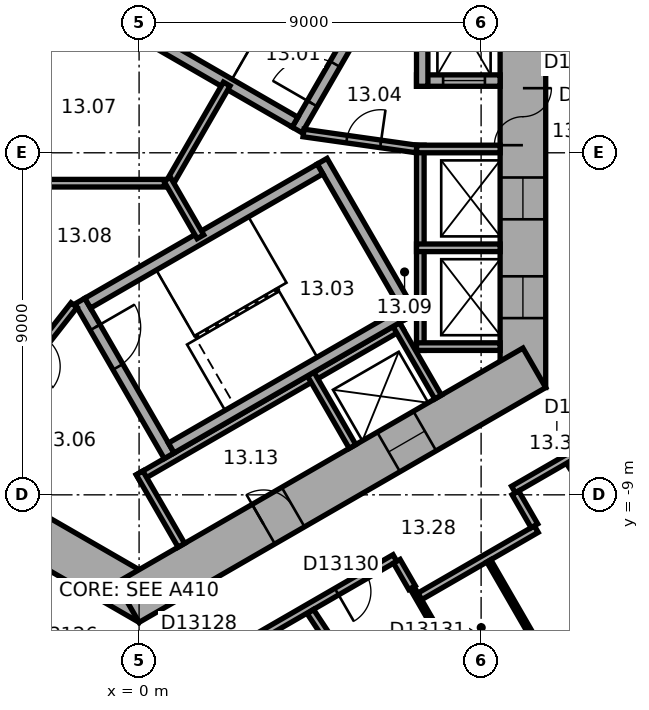
"""IFC4 building model, lengths in metres.
Left out: names, types, materials, properties, quantities, classifications, styles, units other than length and angle.
Written with IfcOpenShell. Run it as: python <this file> out.ifc"""

import sys

from ifc_helpers import new_model, si_unit, direction, frame, frame_2d, origin, place, context, subcontext, project, spatial, rectangle, extrude, element, fill, save


model = new_model("IFC4")
c1 = context("Model", 3, precision=1e-05, world=origin(), true_north=direction((0.0, 1.0)))
c2 = subcontext(c1, "Body", "Model", "MODEL_VIEW")
j1 = project(units=[si_unit("LENGTHUNIT", "METRE"), si_unit("PLANEANGLEUNIT", "RADIAN")], contexts=[c1])
p1 = place(None, origin())
s1 = spatial("IfcSite", under=j1, at=p1, CompositionType="ELEMENT")
p2 = place(p1, origin())
s2 = spatial("IfcBuilding", under=s1, at=p2, CompositionType="ELEMENT")
p3 = place(p2, frame((0.0, 0.0, 63.8)))
s3 = spatial("IfcBuildingStorey", under=s2, at=p3, CompositionType="ELEMENT", Elevation=63.8)
p4 = place(p3, frame((10.1, -6.177, 0.0), z_axis=(0.0, 0.0, 1.0), x_axis=(0.0, 1.0, 0.0)))
e1 = element("IfcWall", 1, at=p4, inside=s3, PredefinedType="SHEAR", context=c2, shape_type="SweptSolid", body=[
    extrude(rectangle(XDim=12.355, YDim=1.2, at=frame_2d((6.177, 0.0))), origin(), (0.0, 0.0, 1.0), 3.3),
])
p5 = place(p4, frame((6.378, 0.0, 0.0)))
e2 = element("IfcOpeningElement", 2, at=p5, cuts=e1, PredefinedType="OPENING", context=c2, shape_type="SweptSolid", body=[
    extrude(rectangle(XDim=1.5, YDim=2.1, at=frame_2d((0.75, 1.05))), frame((0.0, 0.61, 0.0), z_axis=(0.0, -1.0, 0.0), x_axis=(1.0, 0.0, 0.0)), (0.0, 0.0, 1.0), 1.22),
])
p6 = place(p4, frame((1.828, 0.0, 0.0)))
e3 = element("IfcOpeningElement", 3, at=p6, cuts=e1, PredefinedType="OPENING", context=c2, shape_type="SweptSolid", body=[
    extrude(rectangle(XDim=1.1, YDim=2.1, at=frame_2d((0.55, 1.05))), frame((0.0, 0.61, 0.0), z_axis=(0.0, -1.0, 0.0), x_axis=(1.0, 0.0, 0.0)), (0.0, 0.0, 1.0), 1.22),
])
p7 = place(p4, frame((4.427, 0.0, 0.0)))
e4 = element("IfcOpeningElement", 4, at=p7, cuts=e1, PredefinedType="OPENING", context=c2, shape_type="SweptSolid", body=[
    extrude(rectangle(XDim=1.1, YDim=2.1, at=frame_2d((0.55, 1.05))), frame((0.0, 0.61, 0.0), z_axis=(0.0, -1.0, 0.0), x_axis=(1.0, 0.0, 0.0)), (0.0, 0.0, 1.0), 1.22),
])
p8 = place(p3, frame((-10.4, -5.658, 0.0), z_axis=(0.0, 0.0, 1.0), x_axis=(0.866021384402, -0.500006961711, 0.0)))
e5 = element("IfcWall", 5, at=p8, inside=s3, PredefinedType="SHEAR", context=c2, shape_type="SweptSolid", body=[
    extrude(rectangle(XDim=12.355, YDim=1.2, at=frame_2d((6.178, 0.0))), origin(), (0.0, 0.0, 1.0), 3.3),
])
p9 = place(p8, frame((6.378, 0.0, 0.0)))
e6 = element("IfcOpeningElement", 6, at=p9, cuts=e5, PredefinedType="OPENING", context=c2, shape_type="SweptSolid", body=[
    extrude(rectangle(XDim=1.5, YDim=2.1, at=frame_2d((0.75, 1.05))), frame((0.0, 0.61, 0.0), z_axis=(0.0, -1.0, 0.0), x_axis=(1.0, 0.0, 0.0)), (0.0, 0.0, 1.0), 1.22),
])
p10 = place(p8, frame((3.228, 0.0, 0.0)))
e7 = element("IfcOpeningElement", 7, at=p10, cuts=e5, PredefinedType="OPENING", context=c2, shape_type="SweptSolid", body=[
    extrude(rectangle(XDim=0.9, YDim=2.1, at=frame_2d((0.45, 1.05))), frame((0.0, 0.61, 0.0), z_axis=(0.0, -1.0, 0.0), x_axis=(1.0, 0.0, 0.0)), (0.0, 0.0, 1.0), 1.22),
])
p11 = place(p3, frame((-0.3, -11.836, 0.0), z_axis=(0.0, 0.0, 1.0), x_axis=(0.866021384402, 0.500006961711, 0.0)))
e8 = element("IfcWall", 8, at=p11, inside=s3, PredefinedType="SHEAR", context=c2, shape_type="SweptSolid", body=[
    extrude(rectangle(XDim=12.355, YDim=1.2, at=frame_2d((6.178, 0.0))), origin(), (0.0, 0.0, 1.0), 3.3),
])
p12 = place(p11, frame((4.128, 0.0, 0.0)))
e9 = element("IfcOpeningElement", 9, at=p12, cuts=e8, PredefinedType="OPENING", context=c2, shape_type="SweptSolid", body=[
    extrude(rectangle(XDim=0.9, YDim=2.1, at=frame_2d((0.45, 1.05))), frame((0.0, 0.61, 0.0), z_axis=(0.0, -1.0, 0.0), x_axis=(1.0, 0.0, 0.0)), (0.0, 0.0, 1.0), 1.22),
])
p13 = place(p11, frame((7.928, 0.0, 0.0)))
e10 = element("IfcOpeningElement", 10, at=p13, cuts=e8, PredefinedType="OPENING", context=c2, shape_type="SweptSolid", body=[
    extrude(rectangle(XDim=1.1, YDim=2.1, at=frame_2d((0.55, 1.05))), frame((0.0, 0.61, 0.0), z_axis=(0.0, -1.0, 0.0), x_axis=(1.0, 0.0, 0.0)), (0.0, 0.0, 1.0), 1.22),
])
p14 = place(p3, frame((7.4, -5.2, 0.0), z_axis=(0.0, 0.0, 1.0), x_axis=(0.0, 1.0, 0.0)))
e11 = element("IfcWall", 11, at=p14, inside=s3, PredefinedType="PARTITIONING", context=c2, shape_type="SweptSolid", body=[
    extrude(rectangle(XDim=5.4, YDim=0.2, at=frame_2d((2.7, 0.0))), origin(), (0.0, 0.0, 1.0), 3.05),
])
for number, where, z_axis, x_axis in (
    (12, (7.3, -5.1, 0.0), (0.0, 0.0, 1.0), (1.0, 0.0, 0.0)),
    (13, (7.3, -2.5, 0.0), (0.0, 0.0, 1.0), (1.0, 0.0, 0.0)),
    (14, (7.3, 0.1, 0.0), (0.0, 0.0, 1.0), (1.0, 0.0, 0.0)),
):
    element("IfcWall", number, at=place(p3, frame(where, z_axis=z_axis, x_axis=x_axis)), inside=s3, PredefinedType="PARTITIONING", context=c2, shape_type="SweptSolid", body=[
        extrude(rectangle(XDim=2.2, YDim=0.2, at=frame_2d((1.1, 0.0))), origin(), (0.0, 0.0, 1.0), 3.05),
    ])
p15 = place(p3, frame((-0.024, -8.559, 0.0), z_axis=(0.0, 0.0, 1.0), x_axis=(0.866026010844, 0.49999894854, 0.0)))
e15 = element("IfcWall", 15, at=p15, inside=s3, PredefinedType="PARTITIONING", context=c2, shape_type="SweptSolid", body=[
    extrude(rectangle(XDim=8.0, YDim=0.2, at=frame_2d((4.0, 0.0))), origin(), (0.0, 0.0, 1.0), 3.05),
])
for number, where, z_axis, x_axis in (
    (16, (0.013, -8.422, 0.0), (0.0, 0.0, 1.0), (0.5, -0.866, 0.0)),
    (17, (4.516, -5.822, 0.0), (0.0, 0.0, 1.0), (0.5, -0.866, 0.0)),
    (18, (6.768, -4.522, 0.0), (0.0, 0.0, 1.0), (0.5, -0.866, 0.0)),
):
    element("IfcWall", number, at=place(p3, frame(where, z_axis=z_axis, x_axis=x_axis)), inside=s3, PredefinedType="PARTITIONING", context=c2, shape_type="SweptSolid", body=[
        extrude(rectangle(XDim=2.2, YDim=0.2, at=frame_2d((1.1, 0.0))), origin(), (0.0, 0.0, 1.0), 3.05),
    ])
p16 = place(p3, frame((4.158, 0.602, 0.0), z_axis=(0.0, 0.0, 1.0), x_axis=(0.499977259774, 0.866038532462, 0.0)))
e19 = element("IfcWall", 19, at=p16, inside=s3, PredefinedType="SHEAR", context=c2, shape_type="SweptSolid", body=[
    extrude(rectangle(XDim=4.7, YDim=0.3, at=frame_2d((2.35, 0.0))), origin(), (0.0, 0.0, 1.0), 3.05),
])
p17 = place(p16, frame((0.8, 0.0, 0.0)))
e20 = element("IfcOpeningElement", 20, at=p17, cuts=e19, PredefinedType="OPENING", context=c2, shape_type="SweptSolid", body=[
    extrude(rectangle(XDim=1.2, YDim=2.1, at=frame_2d((0.6, 1.05))), frame((0.0, 0.16, 0.0), z_axis=(0.0, -1.0, 0.0), x_axis=(1.0, 0.0, 0.0)), (0.0, 0.0, 1.0), 0.32),
])
p18 = place(p3, frame((4.103, 0.807, 0.0), z_axis=(0.0, 0.0, 1.0), x_axis=(-0.866027801685, 0.499995846692, 0.0)))
e21 = element("IfcWall", 21, at=p18, inside=s3, PredefinedType="SHEAR", context=c2, shape_type="SweptSolid", body=[
    extrude(rectangle(XDim=7.06, YDim=0.3, at=frame_2d((3.53, 0.0))), origin(), (0.0, 0.0, 1.0), 3.05),
])
p19 = place(p3, frame((-1.558, -3.902, 0.0), z_axis=(0.0, 0.0, 1.0), x_axis=(0.499977259774, -0.866038532462, 0.0)))
e22 = element("IfcWall", 22, at=p19, inside=s3, PredefinedType="SHEAR", context=c2, shape_type="SweptSolid", body=[
    extrude(rectangle(XDim=4.7, YDim=0.3, at=frame_2d((2.35, 0.0))), origin(), (0.0, 0.0, 1.0), 3.05),
])
p20 = place(p19, frame((0.8, 0.0, 0.0)))
e23 = element("IfcOpeningElement", 23, at=p20, cuts=e22, PredefinedType="OPENING", context=c2, shape_type="SweptSolid", body=[
    extrude(rectangle(XDim=1.2, YDim=2.1, at=frame_2d((0.6, 1.05))), frame((0.0, 0.16, 0.0), z_axis=(0.0, -1.0, 0.0), x_axis=(1.0, 0.0, 0.0)), (0.0, 0.0, 1.0), 0.32),
])
p21 = place(p3, frame((4.816, -0.222, 0.0), z_axis=(0.0, 0.0, 1.0), x_axis=(0.499977259774, -0.866038532462, 0.0)))
e24 = element("IfcWall", 24, at=p21, inside=s3, PredefinedType="SHEAR", context=c2, shape_type="SweptSolid", body=[
    extrude(rectangle(XDim=4.7, YDim=0.3, at=frame_2d((2.35, 0.0))), origin(), (0.0, 0.0, 1.0), 3.05),
])
for number, where, z_axis, x_axis in (
    (25, (-1.353, -3.957, 0.0), (0.0, 0.0, 1.0), (0.866, 0.5, 0.0)),
    (26, (0.847, -7.767, 0.0), (0.0, 0.0, 1.0), (0.866, 0.5, 0.0)),
):
    element("IfcWall", number, at=place(p3, frame(where, z_axis=z_axis, x_axis=x_axis)), inside=s3, PredefinedType="SHEAR", context=c2, shape_type="SweptSolid", body=[
        extrude(rectangle(XDim=7.06, YDim=0.3, at=frame_2d((3.53, 0.0))), origin(), (0.0, 0.0, 1.0), 3.05),
    ])
p22 = place(p3, frame((7.3, 1.9, 0.0), z_axis=(0.0, 0.0, 1.0), x_axis=(1.0, 0.0, 0.0)))
e27 = element("IfcWall", 27, at=p22, inside=s3, PredefinedType="SHEAR", context=c2, shape_type="SweptSolid", body=[
    extrude(rectangle(XDim=2.2, YDim=0.3, at=frame_2d((1.1, 0.0))), origin(), (0.0, 0.0, 1.0), 3.05),
])
p23 = place(p22, frame((0.7, 0.0, 0.0)))
e28 = element("IfcOpeningElement", 28, at=p23, cuts=e27, PredefinedType="OPENING", context=c2, shape_type="SweptSolid", body=[
    extrude(rectangle(XDim=1.1, YDim=2.1, at=frame_2d((0.55, 1.05))), frame((0.0, 0.16, 0.0), z_axis=(0.0, -1.0, 0.0), x_axis=(1.0, 0.0, 0.0)), (0.0, 0.0, 1.0), 0.32),
])
p24 = place(p3, frame((7.45, 1.75, 0.0), z_axis=(0.0, 0.0, 1.0), x_axis=(0.0, 1.0, 0.0)))
e29 = element("IfcWall", 29, at=p24, inside=s3, PredefinedType="SHEAR", context=c2, shape_type="SweptSolid", body=[
    extrude(rectangle(XDim=3.35, YDim=0.3, at=frame_2d((1.675, 0.0))), origin(), (0.0, 0.0, 1.0), 3.05),
])
p25 = place(p3, frame((4.327, 0.521, 0.0), z_axis=(0.0, 0.0, 1.0), x_axis=(0.990124376366, -0.14019172346, 0.0)))
e30 = element("IfcWall", 30, at=p25, inside=s3, PredefinedType="PARTITIONING", context=c2, shape_type="SweptSolid", body=[
    extrude(rectangle(XDim=3.002, YDim=0.2, at=frame_2d((1.501, 0.0))), origin(), (0.0, 0.0, 1.0), 3.05),
])
p26 = place(p25, frame((1.15, 0.0, 0.0)))
e31 = element("IfcOpeningElement", 31, at=p26, cuts=e30, PredefinedType="OPENING", context=c2, shape_type="SweptSolid", body=[
    extrude(rectangle(XDim=0.9, YDim=2.1, at=frame_2d((0.45, 1.05))), frame((0.0, 0.11, 0.0), z_axis=(0.0, -1.0, 0.0), x_axis=(1.0, 0.0, 0.0)), (0.0, 0.0, 1.0), 0.22),
])
p27 = place(p3, frame((-1.712, -4.008, 0.0), z_axis=(0.0, 0.0, 1.0), x_axis=(-0.616549420702, -0.787316208287, 0.0)))
e32 = element("IfcWall", 32, at=p27, inside=s3, PredefinedType="PARTITIONING", context=c2, shape_type="SweptSolid", body=[
    extrude(rectangle(XDim=3.002, YDim=0.2, at=frame_2d((1.501, 0.0))), origin(), (0.0, 0.0, 1.0), 3.05),
])
p28 = place(p27, frame((1.15, 0.0, 0.0)))
e33 = element("IfcOpeningElement", 33, at=p28, cuts=e32, PredefinedType="OPENING", context=c2, shape_type="SweptSolid", body=[
    extrude(rectangle(XDim=0.9, YDim=2.1, at=frame_2d((0.45, 1.05))), frame((0.0, 0.11, 0.0), z_axis=(0.0, -1.0, 0.0), x_axis=(1.0, 0.0, 0.0)), (0.0, 0.0, 1.0), 0.22),
])
p29 = place(p3, frame((0.92, -0.8, 0.0), z_axis=(0.0, 0.0, 1.0), x_axis=(-1.0, 0.0, 0.0)))
e34 = element("IfcWall", 34, at=p29, inside=s3, PredefinedType="PARTITIONING", context=c2, shape_type="SweptSolid", body=[
    extrude(rectangle(XDim=3.64, YDim=0.2, at=frame_2d((1.82, 0.0))), origin(), (0.0, 0.0, 1.0), 3.05),
])
p30 = place(p3, frame((0.74, -0.904, 0.0), z_axis=(0.0, 0.0, 1.0), x_axis=(0.500028278809, 0.866009076391, 0.0)))
e35 = element("IfcWall", 35, at=p30, inside=s3, PredefinedType="PARTITIONING", context=c2, shape_type="SweptSolid", body=[
    extrude(rectangle(XDim=3.133, YDim=0.2, at=frame_2d((1.566, 0.0))), origin(), (0.0, 0.0, 1.0), 3.05),
])
p31 = place(p3, frame((0.74, -0.696, 0.0), z_axis=(0.0, 0.0, 1.0), x_axis=(0.499956301907, -0.86605063142, 0.0)))
e36 = element("IfcWall", 36, at=p31, inside=s3, PredefinedType="PARTITIONING", context=c2, shape_type="SweptSolid", body=[
    extrude(rectangle(XDim=1.747, YDim=0.2, at=frame_2d((0.874, 0.0))), origin(), (0.0, 0.0, 1.0), 3.05),
])
p32 = place(p3, frame((-11.615, -7.843, 0.0), z_axis=(0.0, 0.0, 1.0), x_axis=(0.866026466995, -0.499998158461, 0.0)))
e37 = element("IfcWall", 37, at=p32, inside=s3, PredefinedType="PARTITIONING", context=c2, shape_type="SweptSolid", body=[
    extrude(rectangle(XDim=12.315, YDim=0.2, at=frame_2d((6.158, 0.0))), origin(), (0.0, 0.0, 1.0), 3.05),
])
p33 = place(p32, frame((5.983, 0.0, 0.0)))
e38 = element("IfcOpeningElement", 38, at=p33, cuts=e37, PredefinedType="OPENING", context=c2, shape_type="SweptSolid", body=[
    extrude(rectangle(XDim=0.9, YDim=2.1, at=frame_2d((0.45, 1.05))), frame((0.0, 0.11, 0.0), z_axis=(0.0, -1.0, 0.0), x_axis=(1.0, 0.0, 0.0)), (0.0, 0.0, 1.0), 0.22),
])
p34 = place(p32, frame((10.229, 0.0, 0.0)))
e39 = element("IfcOpeningElement", 39, at=p34, cuts=e37, PredefinedType="OPENING", context=c2, shape_type="SweptSolid", body=[
    extrude(rectangle(XDim=0.9, YDim=2.1, at=frame_2d((0.45, 1.05))), frame((0.0, 0.11, 0.0), z_axis=(0.0, -1.0, 0.0), x_axis=(1.0, 0.0, 0.0)), (0.0, 0.0, 1.0), 0.22),
])
p35 = place(p3, frame((1.033, -13.953, 0.0), z_axis=(0.0, 0.0, 1.0), x_axis=(0.866017531406, 0.500013635111, 0.0)))
e40 = element("IfcWall", 40, at=p35, inside=s3, PredefinedType="PARTITIONING", context=c2, shape_type="SweptSolid", body=[
    extrude(rectangle(XDim=6.58, YDim=0.2, at=frame_2d((3.29, 0.0))), origin(), (0.0, 0.0, 1.0), 3.05),
])
p36 = place(p35, frame((0.496, 0.0, 0.0)))
e41 = element("IfcOpeningElement", 41, at=p36, cuts=e40, PredefinedType="OPENING", context=c2, shape_type="SweptSolid", body=[
    extrude(rectangle(XDim=0.9, YDim=2.1, at=frame_2d((0.45, 1.05))), frame((0.0, 0.11, 0.0), z_axis=(0.0, -1.0, 0.0), x_axis=(1.0, 0.0, 0.0)), (0.0, 0.0, 1.0), 0.22),
])
p37 = place(p35, frame((4.811, 0.0, 0.0)))
e42 = element("IfcOpeningElement", 42, at=p37, cuts=e40, PredefinedType="OPENING", context=c2, shape_type="SweptSolid", body=[
    extrude(rectangle(XDim=0.9, YDim=2.1, at=frame_2d((0.45, 1.05))), frame((0.0, 0.11, 0.0), z_axis=(0.0, -1.0, 0.0), x_axis=(1.0, 0.0, 0.0)), (0.0, 0.0, 1.0), 0.22),
])
p38 = place(p3, frame((6.782, -10.749, 0.0), z_axis=(0.0, 0.0, 1.0), x_axis=(0.500170954823, -0.865926680471, 0.0)))
e43 = element("IfcWall", 43, at=p38, inside=s3, PredefinedType="PARTITIONING", context=c2, shape_type="SweptSolid", body=[
    extrude(rectangle(XDim=0.801, YDim=0.2, at=frame_2d((0.4, 0.0))), origin(), (0.0, 0.0, 1.0), 3.05),
])
p39 = place(p3, frame((7.385, -11.673, 0.0), z_axis=(0.0, 0.0, 1.0), x_axis=(0.866037524642, 0.499979005472, 0.0)))
e44 = element("IfcWall", 44, at=p39, inside=s3, PredefinedType="PARTITIONING", context=c2, shape_type="SweptSolid", body=[
    extrude(rectangle(XDim=3.542, YDim=0.2, at=frame_2d((1.771, 0.0))), origin(), (0.0, 0.0, 1.0), 3.05),
])
p40 = place(p3, frame((8.833, -14.301, 0.0), z_axis=(0.0, 0.0, 1.0), x_axis=(-0.499936836718, 0.866061868051, 0.0)))
e45 = element("IfcWall", 45, at=p40, inside=s3, PredefinedType="PARTITIONING", context=c2, shape_type="SweptSolid", body=[
    extrude(rectangle(XDim=3.188, YDim=0.12, at=frame_2d((1.594, 0.0))), origin(), (0.0, 0.0, 1.0), 3.05),
])
p41 = place(p40, frame((1.144, 0.0, 0.0)))
e46 = element("IfcOpeningElement", 46, at=p41, cuts=e45, PredefinedType="OPENING", context=c2, shape_type="SweptSolid", body=[
    extrude(rectangle(XDim=0.9, YDim=2.1, at=frame_2d((0.45, 1.05))), frame((0.0, 0.07, 0.0), z_axis=(0.0, -1.0, 0.0), x_axis=(1.0, 0.0, 0.0)), (0.0, 0.0, 1.0), 0.14),
])
p42 = place(p3, frame((9.203, -10.738, 0.0), z_axis=(0.0, 0.0, 1.0), x_axis=(0.50005036918, -0.865996321171, 0.0)))
e47 = element("IfcWall", 47, at=p42, inside=s3, PredefinedType="PARTITIONING", context=c2, shape_type="SweptSolid", body=[
    extrude(rectangle(XDim=2.9, YDim=0.12, at=frame_2d((1.45, 0.0))), origin(), (0.0, 0.0, 1.0), 3.05),
])
p43 = place(p3, frame((9.693, -19.907, 0.0), z_axis=(0.0, 0.0, 1.0), x_axis=(-0.551938394837, 0.833884889121, 0.0)))
e48 = element("IfcWall", 48, at=p43, inside=s3, PredefinedType="PARTITIONING", context=c2, shape_type="SweptSolid", body=[
    extrude(rectangle(XDim=9.394, YDim=0.2, at=frame_2d((4.697, 0.0))), origin(), (0.0, 0.0, 1.0), 2.6),
])
p44 = place(p3, frame((9.852, -8.861, 0.0), z_axis=(0.0, 0.0, 1.0), x_axis=(0.866013291437, 0.500020978615, 0.0)))
e49 = element("IfcWall", 49, at=p44, inside=s3, PredefinedType="PARTITIONING", context=c2, shape_type="SweptSolid", body=[
    extrude(rectangle(XDim=2.077, YDim=0.2, at=frame_2d((1.038, 0.0))), origin(), (0.0, 0.0, 1.0), 3.05),
])
p45 = place(p3, frame((10.402, -9.815, 0.0), z_axis=(0.0, 0.0, 1.0), x_axis=(-0.499968756647, 0.866043441391, 0.0)))
e50 = element("IfcWall", 50, at=p45, inside=s3, PredefinedType="PARTITIONING", context=c2, shape_type="SweptSolid", body=[
    extrude(rectangle(XDim=1.001, YDim=0.2, at=frame_2d((0.5, 0.0))), origin(), (0.0, 0.0, 1.0), 3.05),
])
p46 = place(p3, frame((16.255, -15.564, 0.0), z_axis=(0.0, 0.0, 1.0), x_axis=(-0.55192208744, 0.833895682562, 0.0)))
e51 = element("IfcWall", 51, at=p46, inside=s3, PredefinedType="PARTITIONING", context=c2, shape_type="SweptSolid", body=[
    extrude(rectangle(XDim=8.913, YDim=0.2, at=frame_2d((4.457, 0.0))), origin(), (0.0, 0.0, 1.0), 2.6),
])
p47 = place(p5, origin())
e52 = element("IfcDoor", 52, at=p47, inside=s3, OperationType="DOUBLE_DOOR_SINGLE_SWING", PredefinedType="DOOR", context=c2, shape_type="SweptSolid", body=[
    extrude(rectangle(XDim=1.5, YDim=2.1, at=frame_2d((0.75, 1.05))), frame((0.0, 0.025, 0.0), z_axis=(0.0, -1.0, 0.0), x_axis=(1.0, 0.0, 0.0)), (0.0, 0.0, 1.0), 0.05),
])
fill(e2, e52)
p48 = place(p17, origin())
e53 = element("IfcDoor", 53, at=p48, inside=s3, OperationType="SINGLE_SWING_RIGHT", PredefinedType="DOOR", context=c2, shape_type="SweptSolid", body=[
    extrude(rectangle(XDim=1.2, YDim=2.1, at=frame_2d((0.6, 1.05))), frame((0.0, 0.025, 0.0), z_axis=(0.0, -1.0, 0.0), x_axis=(1.0, 0.0, 0.0)), (0.0, 0.0, 1.0), 0.05),
])
fill(e20, e53)
p49 = place(p20, origin())
e54 = element("IfcDoor", 54, at=p49, inside=s3, OperationType="SINGLE_SWING_RIGHT", PredefinedType="DOOR", context=c2, shape_type="SweptSolid", body=[
    extrude(rectangle(XDim=1.2, YDim=2.1, at=frame_2d((0.6, 1.05))), frame((0.0, 0.025, 0.0), z_axis=(0.0, -1.0, 0.0), x_axis=(1.0, 0.0, 0.0)), (0.0, 0.0, 1.0), 0.05),
])
fill(e23, e54)
p50 = place(p26, origin())
e55 = element("IfcDoor", 55, at=p50, inside=s3, OperationType="SINGLE_SWING_LEFT", PredefinedType="DOOR", context=c2, shape_type="SweptSolid", body=[
    extrude(rectangle(XDim=0.9, YDim=2.1, at=frame_2d((0.45, 1.05))), frame((0.0, 0.025, 0.0), z_axis=(0.0, -1.0, 0.0), x_axis=(1.0, 0.0, 0.0)), (0.0, 0.0, 1.0), 0.05),
])
fill(e31, e55)
p51 = place(p12, origin())
e56 = element("IfcDoor", 56, at=p51, inside=s3, OperationType="SINGLE_SWING_LEFT", PredefinedType="DOOR", context=c2, shape_type="SweptSolid", body=[
    extrude(rectangle(XDim=0.9, YDim=2.1, at=frame_2d((0.45, 1.05))), frame((0.0, 0.025, 0.0), z_axis=(0.0, -1.0, 0.0), x_axis=(1.0, 0.0, 0.0)), (0.0, 0.0, 1.0), 0.05),
])
fill(e9, e56)
p52 = place(p23, origin())
e57 = element("IfcDoor", 57, at=p52, inside=s3, OperationType="DOUBLE_DOOR_SLIDING", PredefinedType="DOOR", context=c2, shape_type="SweptSolid", body=[
    extrude(rectangle(XDim=1.1, YDim=2.1, at=frame_2d((0.55, 1.05))), frame((0.0, 0.025, 0.0), z_axis=(0.0, -1.0, 0.0), x_axis=(1.0, 0.0, 0.0)), (0.0, 0.0, 1.0), 0.05),
])
fill(e28, e57)
p53 = place(p6, origin())
e58 = element("IfcDoor", 58, at=p53, inside=s3, OperationType="DOUBLE_DOOR_SLIDING", PredefinedType="DOOR", context=c2, shape_type="SweptSolid", body=[
    extrude(rectangle(XDim=1.1, YDim=2.1, at=frame_2d((0.55, 1.05))), frame((0.0, 0.025, 0.0), z_axis=(0.0, -1.0, 0.0), x_axis=(1.0, 0.0, 0.0)), (0.0, 0.0, 1.0), 0.05),
])
fill(e3, e58)
p54 = place(p7, origin())
e59 = element("IfcDoor", 59, at=p54, inside=s3, OperationType="DOUBLE_DOOR_SLIDING", PredefinedType="DOOR", context=c2, shape_type="SweptSolid", body=[
    extrude(rectangle(XDim=1.1, YDim=2.1, at=frame_2d((0.55, 1.05))), frame((0.0, 0.025, 0.0), z_axis=(0.0, -1.0, 0.0), x_axis=(1.0, 0.0, 0.0)), (0.0, 0.0, 1.0), 0.05),
])
fill(e4, e59)
p55 = place(p13, origin())
e60 = element("IfcDoor", 60, at=p55, inside=s3, OperationType="DOUBLE_DOOR_SLIDING", PredefinedType="DOOR", context=c2, shape_type="SweptSolid", body=[
    extrude(rectangle(XDim=1.1, YDim=2.1, at=frame_2d((0.55, 1.05))), frame((0.0, 0.025, 0.0), z_axis=(0.0, -1.0, 0.0), x_axis=(1.0, 0.0, 0.0)), (0.0, 0.0, 1.0), 0.05),
])
fill(e10, e60)
p56 = place(p37, origin())
e61 = element("IfcDoor", 61, at=p56, inside=s3, OperationType="SINGLE_SWING_LEFT", PredefinedType="DOOR", context=c2, shape_type="SweptSolid", body=[
    extrude(rectangle(XDim=0.9, YDim=2.1, at=frame_2d((0.45, 1.05))), frame((0.0, 0.025, 0.0), z_axis=(0.0, -1.0, 0.0), x_axis=(1.0, 0.0, 0.0)), (0.0, 0.0, 1.0), 0.05),
])
fill(e42, e61)
p57 = place(p41, origin())
e62 = element("IfcDoor", 62, at=p57, inside=s3, OperationType="SINGLE_SWING_LEFT", PredefinedType="DOOR", context=c2, shape_type="SweptSolid", body=[
    extrude(rectangle(XDim=0.9, YDim=2.1, at=frame_2d((0.45, 1.05))), frame((0.0, 0.025, 0.0), z_axis=(0.0, -1.0, 0.0), x_axis=(1.0, 0.0, 0.0)), (0.0, 0.0, 1.0), 0.05),
])
fill(e46, e62)
save(model, sys.argv[1])
